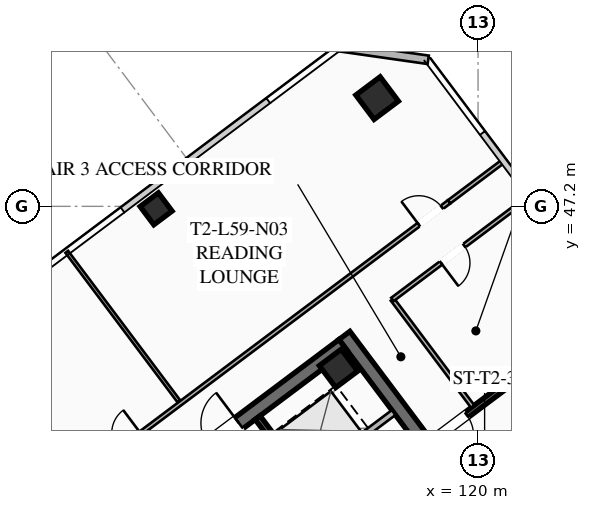
"""IFC4 building model, lengths in metres.
Left out: names, types, materials, properties, quantities, classifications, styles, units other than length and angle.
Written with IfcOpenShell. Run it as: python <this file> out.ifc"""

import sys

from ifc_helpers import new_model, si_unit, direction, frame, frame_2d, origin, origin_2d, place, context, subcontext, project, spatial, rectangle, hollow_rectangle, extrude, element, fill, save


model = new_model("IFC4")
c1 = context("Model", 3, precision=1e-05, world=origin(), true_north=direction((0.0, 1.0)))
c2 = subcontext(c1, "Body", "Model", "MODEL_VIEW")
j1 = project(units=[si_unit("LENGTHUNIT", "METRE"), si_unit("PLANEANGLEUNIT", "RADIAN")], contexts=[c1])
p1 = place(None, origin())
s1 = spatial("IfcSite", under=j1, at=p1, CompositionType="ELEMENT")
p2 = place(p1, origin())
s2 = spatial("IfcBuilding", under=s1, at=p2, CompositionType="ELEMENT")
p3 = place(p2, frame((0.0, 0.0, 218.4)))
s3 = spatial("IfcBuildingStorey", under=s2, at=p3, CompositionType="ELEMENT", Elevation=218.4)
p4 = place(p3, frame((115.604, 42.953, 0.0), z_axis=(0.0, 0.0, 1.0), x_axis=(0.600005007985, -0.799996243986, 0.0)))
e1 = element("IfcWall", 1, at=p4, inside=s3, PredefinedType="SHEAR", context=c2, shape_type="SweptSolid", body=[
    extrude(rectangle(XDim=15.6, YDim=0.45, at=frame_2d((7.8, 0.0))), origin(), (0.0, 0.0, 1.0), 3.55),
])
p5 = place(p3, frame((103.351, 33.482, 0.0), z_axis=(0.0, 0.0, 1.0), x_axis=(0.8, 0.6, 0.0)))
e2 = element("IfcWall", 2, at=p5, inside=s3, PredefinedType="SHEAR", context=c2, shape_type="SweptSolid", body=[
    extrude(rectangle(XDim=15.26, YDim=0.45, at=frame_2d((7.63, 0.0))), origin(), (0.0, 0.0, 1.0), 3.55),
])
p6 = place(p5, frame((4.68, 0.0, 0.0)))
e3 = element("IfcOpeningElement", 3, at=p6, cuts=e2, PredefinedType="OPENING", context=c2, shape_type="SweptSolid", body=[
    extrude(rectangle(XDim=1.25, YDim=2.25, at=frame_2d((0.625, 1.125))), frame((0.0, 0.235, 0.0), z_axis=(0.0, -1.0, 0.0), x_axis=(1.0, 0.0, 0.0)), (0.0, 0.0, 1.0), 0.47),
])
p7 = place(p5, frame((9.73, 0.0, 0.0)))
e4 = element("IfcOpeningElement", 4, at=p7, cuts=e2, PredefinedType="OPENING", context=c2, shape_type="SweptSolid", body=[
    extrude(rectangle(XDim=1.25, YDim=2.25, at=frame_2d((0.625, 1.125))), frame((0.0, 0.235, 0.0), z_axis=(0.0, -1.0, 0.0), x_axis=(1.0, 0.0, 0.0)), (0.0, 0.0, 1.0), 0.47),
])
p8 = place(p3, frame((115.41, 41.87, 0.0), z_axis=(0.0, 0.0, 1.0), x_axis=(0.799999996291, 0.600000004945, 0.0)))
e5 = element("IfcColumn", 5, at=p8, inside=s3, PredefinedType="COLUMN", context=c2, shape_type="SweptSolid", body=[
    extrude(hollow_rectangle(XDim=0.9, YDim=0.9, WallThickness=0.04, at=origin_2d()), origin(), (0.0, 0.0, 1.0), 3.37),
])
p9 = place(p3, frame((116.68, 50.76, 0.0), z_axis=(0.0, 0.0, 1.0), x_axis=(0.799999996291, 0.600000004945, 0.0)))
e6 = element("IfcColumn", 6, at=p9, inside=s3, PredefinedType="COLUMN", context=c2, shape_type="SweptSolid", body=[
    extrude(hollow_rectangle(XDim=1.0, YDim=1.0, WallThickness=0.04, at=origin_2d()), origin(), (0.0, 0.0, 1.0), 3.37),
])
p10 = place(p3, frame((109.41, 47.12, 0.0), z_axis=(0.0, 0.0, 1.0), x_axis=(0.799999996291, 0.600000004945, 0.0)))
e7 = element("IfcColumn", 7, at=p10, inside=s3, PredefinedType="COLUMN", context=c2, shape_type="SweptSolid", body=[
    extrude(hollow_rectangle(XDim=0.75, YDim=0.75, WallThickness=0.032, at=origin_2d()), origin(), (0.0, 0.0, 1.0), 3.37),
])
p11 = place(p3, frame((115.42, 52.44, 0.0), z_axis=(0.0, 0.0, 1.0), x_axis=(0.989954425158, -0.14138683146, 0.0)))
e8 = element("IfcWall", 8, at=p11, inside=s3, PredefinedType="SOLIDWALL", context=c2, shape_type="SweptSolid", body=[
    extrude(rectangle(XDim=2.97, YDim=0.28, at=frame_2d((1.485, 0.0))), origin(), (0.0, 0.0, 1.0), 3.37),
])
p12 = place(p3, frame((112.75, 40.25, 0.0), z_axis=(0.0, 0.0, 1.0), x_axis=(0.599994036198, -0.800004472816, 0.0)))
e9 = element("IfcWall", 9, at=p12, inside=s3, PredefinedType="SHEAR", context=c2, shape_type="SweptSolid", body=[
    extrude(rectangle(XDim=6.55, YDim=0.2, at=frame_2d((3.275, 0.0))), origin(), (0.0, 0.0, 1.0), 3.37),
])
p13 = place(p12, frame((5.075, 0.0, 0.0)))
e10 = element("IfcOpeningElement", 10, at=p13, cuts=e9, PredefinedType="OPENING", context=c2, shape_type="SweptSolid", body=[
    extrude(rectangle(XDim=1.1, YDim=2.2, at=frame_2d((0.55, 1.1))), frame((0.0, 0.11, 0.0), z_axis=(0.0, -1.0, 0.0), x_axis=(1.0, 0.0, 0.0)), (0.0, 0.0, 1.0), 0.22),
])
p14 = place(p12, frame((3.025, 0.0, 0.0)))
e11 = element("IfcOpeningElement", 11, at=p14, cuts=e9, PredefinedType="OPENING", context=c2, shape_type="SweptSolid", body=[
    extrude(rectangle(XDim=1.1, YDim=2.2, at=frame_2d((0.55, 1.1))), frame((0.0, 0.11, 0.0), z_axis=(0.0, -1.0, 0.0), x_axis=(1.0, 0.0, 0.0)), (0.0, 0.0, 1.0), 0.22),
])
p15 = place(p12, frame((1.025, 0.0, 0.0)))
e12 = element("IfcOpeningElement", 12, at=p15, cuts=e9, PredefinedType="OPENING", context=c2, shape_type="SweptSolid", body=[
    extrude(rectangle(XDim=1.1, YDim=2.2, at=frame_2d((0.55, 1.1))), frame((0.0, 0.11, 0.0), z_axis=(0.0, -1.0, 0.0), x_axis=(1.0, 0.0, 0.0)), (0.0, 0.0, 1.0), 0.22),
])
p16 = place(p3, frame((114.36, 38.27, 0.0), z_axis=(0.0, 0.0, 1.0), x_axis=(0.800008183455, 0.599989088572, 0.0)))
e13 = element("IfcWall", 13, at=p16, inside=s3, PredefinedType="SOLIDWALL", context=c2, shape_type="SweptSolid", body=[
    extrude(rectangle(XDim=3.58, YDim=0.2, at=frame_2d((1.79, 0.0))), origin(), (0.0, 0.0, 1.0), 3.37),
])
p17 = place(p3, frame((121.204, 41.528, 0.0), z_axis=(0.0, 0.0, 1.0), x_axis=(-0.800017232136, -0.599977023131, 0.0)))
e14 = element("IfcWall", 14, at=p17, inside=s3, PredefinedType="SHEAR", context=c2, shape_type="SweptSolid", body=[
    extrude(rectangle(XDim=3.4, YDim=0.2, at=frame_2d((1.7, 0.0))), origin(), (0.0, 0.0, 1.0), 3.37),
])
p18 = place(p17, frame((1.975, 0.0, 0.0)))
e15 = element("IfcOpeningElement", 15, at=p18, cuts=e14, PredefinedType="OPENING", context=c2, shape_type="SweptSolid", body=[
    extrude(rectangle(XDim=1.15, YDim=2.2, at=frame_2d((0.575, 1.1))), frame((0.0, 0.11, 0.0), z_axis=(0.0, -1.0, 0.0), x_axis=(1.0, 0.0, 0.0)), (0.0, 0.0, 1.0), 0.22),
])
p19 = place(p3, frame((119.824, 40.618, 0.0), z_axis=(0.0, 0.0, 1.0), x_axis=(-0.599982243973, 0.800013316712, 0.0)))
e16 = element("IfcWall", 16, at=p19, inside=s3, PredefinedType="PARTITIONING", context=c2, shape_type="SweptSolid", body=[
    extrude(rectangle(XDim=4.4, YDim=0.135, at=frame_2d((2.2, 0.0))), origin(), (0.0, 0.0, 1.0), 2.723),
])
p20 = place(p3, frame((100.826, 33.682, 0.0), z_axis=(0.0, 0.0, 1.0), x_axis=(0.79999742786, 0.600003429504, 0.0)))
e17 = element("IfcWall", 17, at=p20, inside=s3, PredefinedType="PARTITIONING", context=c2, shape_type="SweptSolid", body=[
    extrude(rectangle(XDim=22.78, YDim=0.135, at=frame_2d((11.39, 0.0))), origin(), (0.0, 0.0, 1.0), 2.723),
])
p21 = place(p20, frame((0.3, 0.0, 0.0)))
e18 = element("IfcOpeningElement", 18, at=p21, cuts=e17, PredefinedType="OPENING", context=c2, shape_type="SweptSolid", body=[
    extrude(rectangle(XDim=0.95, YDim=2.05, at=frame_2d((0.475, 1.025))), frame((0.0, 0.077, 0.0), z_axis=(0.0, -1.0, 0.0), x_axis=(1.0, 0.0, 0.0)), (0.0, 0.0, 1.0), 0.155),
])
p22 = place(p20, frame((9.143, 0.0, 0.0)))
e19 = element("IfcOpeningElement", 19, at=p22, cuts=e17, PredefinedType="OPENING", context=c2, shape_type="SweptSolid", body=[
    extrude(rectangle(XDim=0.95, YDim=2.05, at=frame_2d((0.475, 1.025))), frame((0.0, 0.077, 0.0), z_axis=(0.0, -1.0, 0.0), x_axis=(1.0, 0.0, 0.0)), (0.0, 0.0, 1.0), 0.155),
])
p23 = place(p20, frame((21.53, 0.0, 0.0)))
e20 = element("IfcOpeningElement", 20, at=p23, cuts=e17, PredefinedType="OPENING", context=c2, shape_type="SweptSolid", body=[
    extrude(rectangle(XDim=0.95, YDim=2.05, at=frame_2d((0.475, 1.025))), frame((0.0, 0.077, 0.0), z_axis=(0.0, -1.0, 0.0), x_axis=(1.0, 0.0, 0.0)), (0.0, 0.0, 1.0), 0.155),
])
p24 = place(p3, frame((119.05, 47.35, 0.0), z_axis=(0.0, 0.0, 1.0), x_axis=(0.800013138111, 0.599982482119, 0.0)))
e21 = element("IfcWall", 21, at=p24, inside=s3, PredefinedType="PARTITIONING", context=c2, shape_type="SweptSolid", body=[
    extrude(rectangle(XDim=2.23, YDim=0.135, at=frame_2d((1.115, 0.0))), origin(), (0.0, 0.0, 1.0), 2.723),
])
p25 = place(p3, frame((110.162, 40.784, 0.0), z_axis=(0.0, 0.0, 1.0), x_axis=(-0.600006351355, 0.799995236444, 0.0)))
e22 = element("IfcWall", 22, at=p25, inside=s3, PredefinedType="PARTITIONING", context=c2, shape_type="SweptSolid", body=[
    extrude(rectangle(XDim=6.15, YDim=0.11, at=frame_2d((3.075, 0.0))), origin(), (0.0, 0.0, 1.0), 2.723),
])
p26 = place(p3, frame((121.584, 47.438, 0.0), z_axis=(0.0, 0.0, 1.0), x_axis=(-0.79998934637, -0.600014204577, 0.0)))
e23 = element("IfcWall", 23, at=p26, inside=s3, PredefinedType="PARTITIONING", context=c2, shape_type="SweptSolid", body=[
    extrude(rectangle(XDim=5.5, YDim=0.135, at=frame_2d((2.75, 0.0))), origin(), (0.0, 0.0, 1.0), 2.723),
])
p27 = place(p26, frame((2.55, 0.0, 0.0)))
e24 = element("IfcOpeningElement", 24, at=p27, cuts=e23, PredefinedType="OPENING", context=c2, shape_type="SweptSolid", body=[
    extrude(rectangle(XDim=0.95, YDim=2.05, at=frame_2d((0.475, 1.025))), frame((0.0, 0.077, 0.0), z_axis=(0.0, -1.0, 0.0), x_axis=(1.0, 0.0, 0.0)), (0.0, 0.0, 1.0), 0.155),
])
p28 = place(p7, origin())
e25 = element("IfcDoor", 25, at=p28, inside=s3, OperationType="SINGLE_SWING_RIGHT", PredefinedType="DOOR", context=c2, shape_type="SweptSolid", body=[
    extrude(rectangle(XDim=1.25, YDim=2.25, at=frame_2d((0.625, 1.125))), frame((0.0, 0.025, 0.0), z_axis=(0.0, -1.0, 0.0), x_axis=(1.0, 0.0, 0.0)), (0.0, 0.0, 1.0), 0.05),
])
fill(e4, e25)
p29 = place(p18, origin())
e26 = element("IfcDoor", 26, at=p29, inside=s3, OperationType="SINGLE_SWING_RIGHT", PredefinedType="DOOR", context=c2, shape_type="SweptSolid", body=[
    extrude(rectangle(XDim=1.15, YDim=2.2, at=frame_2d((0.575, 1.1))), frame((0.0, 0.025, 0.0), z_axis=(0.0, -1.0, 0.0), x_axis=(1.0, 0.0, 0.0)), (0.0, 0.0, 1.0), 0.05),
])
fill(e15, e26)
p30 = place(p23, origin())
e27 = element("IfcDoor", 27, at=p30, inside=s3, OperationType="SINGLE_SWING_LEFT", PredefinedType="DOOR", context=c2, shape_type="SweptSolid", body=[
    extrude(rectangle(XDim=0.95, YDim=2.05, at=frame_2d((0.475, 1.025))), frame((0.0, 0.025, 0.0), z_axis=(0.0, -1.0, 0.0), x_axis=(1.0, 0.0, 0.0)), (0.0, 0.0, 1.0), 0.05),
])
fill(e20, e27)
p31 = place(p27, origin())
e28 = element("IfcDoor", 28, at=p31, inside=s3, OperationType="SINGLE_SWING_RIGHT", PredefinedType="DOOR", context=c2, shape_type="SweptSolid", body=[
    extrude(rectangle(XDim=0.95, YDim=2.05, at=frame_2d((0.475, 1.025))), frame((0.0, 0.025, 0.0), z_axis=(0.0, -1.0, 0.0), x_axis=(1.0, 0.0, 0.0)), (0.0, 0.0, 1.0), 0.05),
])
fill(e24, e28)
save(model, sys.argv[1])
